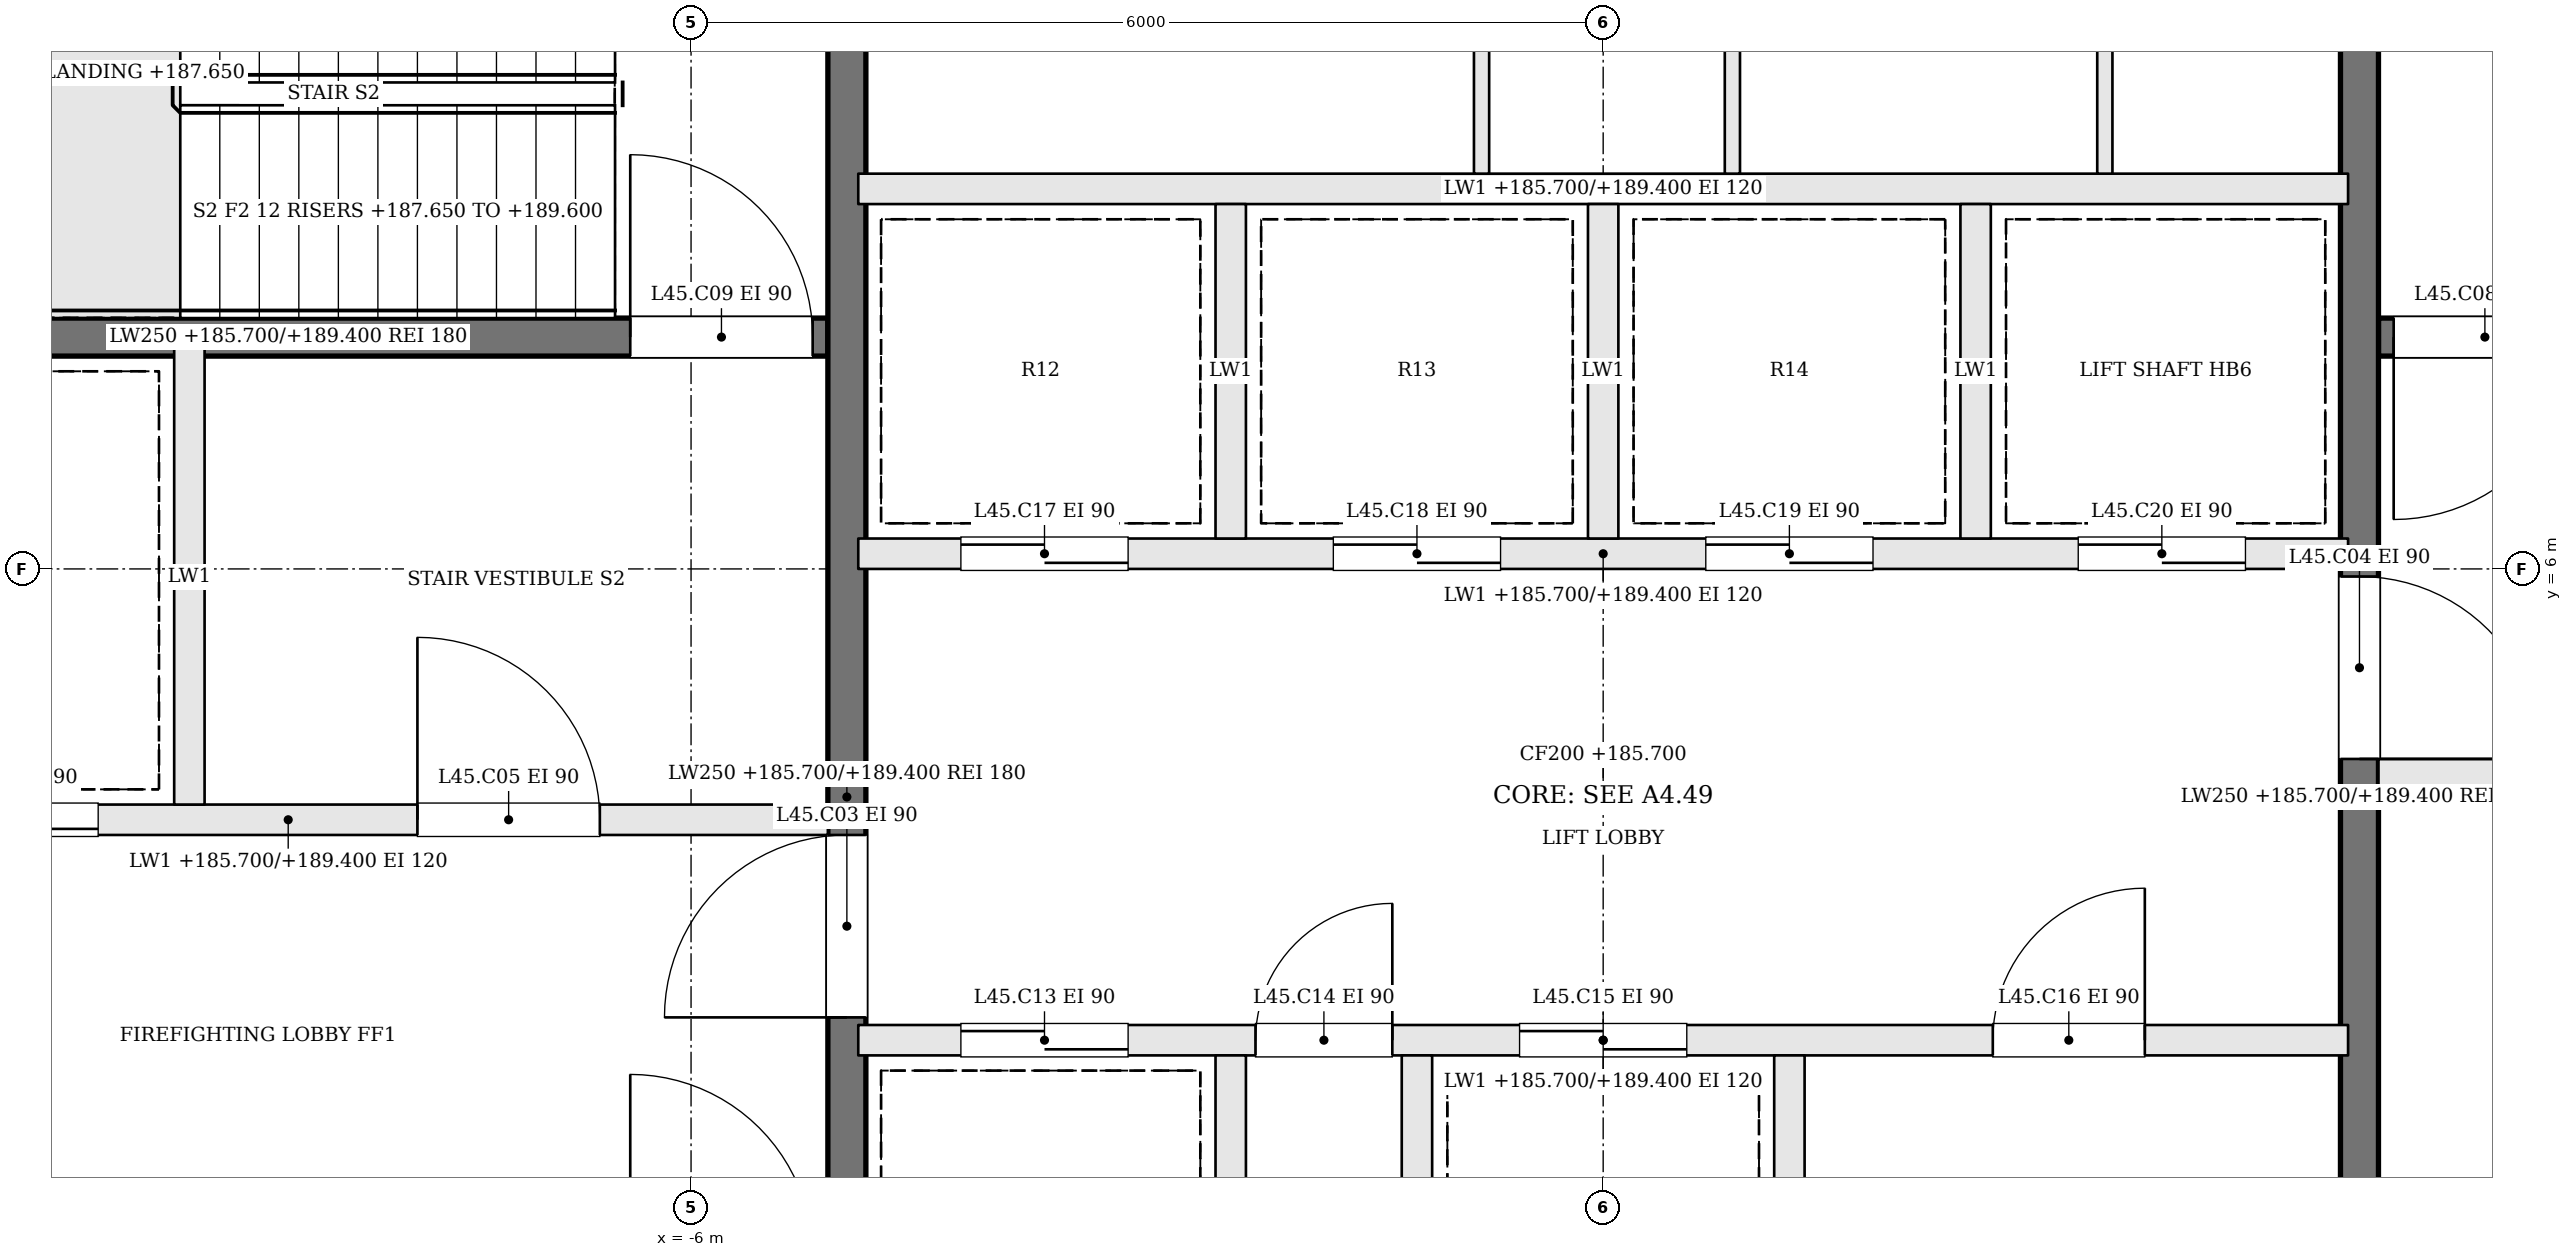
"""IFC4 building model, lengths in metres.
Left out: names, types, materials, properties, quantities, classifications, styles, units other than length and angle.
Written with IfcOpenShell. Run it as: python <this file> out.ifc"""

import sys

from ifc_helpers import new_model, si_unit, direction, frame, frame_2d, origin, place, context, subcontext, project, spatial, rectangle, extrude, element, fill, save


model = new_model("IFC4")
c1 = context("Model", 3, precision=1e-05, world=origin(), true_north=direction((0.0, 1.0)))
c2 = subcontext(c1, "Body", "Model", "MODEL_VIEW")
j1 = project(units=[si_unit("LENGTHUNIT", "METRE"), si_unit("PLANEANGLEUNIT", "RADIAN")], contexts=[c1])
p1 = place(None, origin())
s1 = spatial("IfcSite", under=j1, at=p1, CompositionType="ELEMENT")
p2 = place(p1, origin())
s2 = spatial("IfcBuilding", under=s1, at=p2, CompositionType="ELEMENT")
p3 = place(p2, frame((0.0, 0.0, 185.7)))
s3 = spatial("IfcBuildingStorey", under=s2, at=p3, CompositionType="ELEMENT", Elevation=185.7)
p4 = place(p3, frame((12.2, 7.525, 0.0), z_axis=(0.0, 0.0, 1.0), x_axis=(-1.0, 0.0, 0.0)))
e1 = element("IfcWall", 1, at=p4, inside=s3, PredefinedType="SOLIDWALL", context=c2, shape_type="SweptSolid", body=[
    extrude(rectangle(XDim=7.1, YDim=0.25, at=frame_2d((3.55, 0.0))), origin(), (0.0, 0.0, 1.0), 3.7),
])
p5 = place(p4, frame((5.8, 0.0, 0.0)))
e2 = element("IfcOpeningElement", 2, at=p5, cuts=e1, PredefinedType="OPENING", context=c2, shape_type="SweptSolid", body=[
    extrude(rectangle(XDim=1.2, YDim=2.1, at=frame_2d((0.6, 1.05))), frame((0.0, 0.135, 0.0), z_axis=(0.0, -1.0, 0.0), x_axis=(1.0, 0.0, 0.0)), (0.0, 0.0, 1.0), 0.27),
])
p6 = place(p3, frame((-12.2, 4.35, 0.0), z_axis=(0.0, 0.0, 1.0), x_axis=(1.0, 0.0, 0.0)))
e3 = element("IfcWall", 3, at=p6, inside=s3, PredefinedType="SOLIDWALL", context=c2, shape_type="SweptSolid", body=[
    extrude(rectangle(XDim=7.1, YDim=0.2, at=frame_2d((3.55, 0.0))), origin(), (0.0, 0.0, 1.0), 3.7),
])
p7 = place(p6, frame((4.4, 0.0, 0.0)))
e4 = element("IfcOpeningElement", 4, at=p7, cuts=e3, PredefinedType="OPENING", context=c2, shape_type="SweptSolid", body=[
    extrude(rectangle(XDim=1.2, YDim=2.1, at=frame_2d((0.6, 1.05))), frame((0.0, 0.11, 0.0), z_axis=(0.0, -1.0, 0.0), x_axis=(1.0, 0.0, 0.0)), (0.0, 0.0, 1.0), 0.22),
])
p8 = place(p6, frame((1.1, 0.0, 0.0)))
e5 = element("IfcOpeningElement", 5, at=p8, cuts=e3, PredefinedType="OPENING", context=c2, shape_type="SweptSolid", body=[
    extrude(rectangle(XDim=1.2, YDim=2.1, at=frame_2d((0.6, 1.05))), frame((0.0, 0.11, 0.0), z_axis=(0.0, -1.0, 0.0), x_axis=(1.0, 0.0, 0.0)), (0.0, 0.0, 1.0), 0.22),
])
p9 = place(p3, frame((12.2, 4.65, 0.0), z_axis=(0.0, 0.0, 1.0), x_axis=(-1.0, 0.0, 0.0)))
e6 = element("IfcWall", 6, at=p9, inside=s3, PredefinedType="SOLIDWALL", context=c2, shape_type="SweptSolid", body=[
    extrude(rectangle(XDim=7.1, YDim=0.2, at=frame_2d((3.55, 0.0))), origin(), (0.0, 0.0, 1.0), 3.7),
])
p10 = place(p9, frame((4.4, 0.0, 0.0)))
e7 = element("IfcOpeningElement", 7, at=p10, cuts=e6, PredefinedType="OPENING", context=c2, shape_type="SweptSolid", body=[
    extrude(rectangle(XDim=1.2, YDim=2.1, at=frame_2d((0.6, 1.05))), frame((0.0, 0.11, 0.0), z_axis=(0.0, -1.0, 0.0), x_axis=(1.0, 0.0, 0.0)), (0.0, 0.0, 1.0), 0.22),
])
p11 = place(p9, frame((1.1, 0.0, 0.0)))
e8 = element("IfcOpeningElement", 8, at=p11, cuts=e6, PredefinedType="OPENING", context=c2, shape_type="SweptSolid", body=[
    extrude(rectangle(XDim=1.2, YDim=2.1, at=frame_2d((0.6, 1.05))), frame((0.0, 0.11, 0.0), z_axis=(0.0, -1.0, 0.0), x_axis=(1.0, 0.0, 0.0)), (0.0, 0.0, 1.0), 0.22),
])
p12 = place(p3, frame((-12.2, 7.525, 0.0), z_axis=(0.0, 0.0, 1.0), x_axis=(1.0, 0.0, 0.0)))
e9 = element("IfcWall", 9, at=p12, inside=s3, PredefinedType="SOLIDWALL", context=c2, shape_type="SweptSolid", body=[
    extrude(rectangle(XDim=7.1, YDim=0.25, at=frame_2d((3.55, 0.0))), origin(), (0.0, 0.0, 1.0), 3.7),
])
p13 = place(p12, frame((5.8, 0.0, 0.0)))
e10 = element("IfcOpeningElement", 10, at=p13, cuts=e9, PredefinedType="OPENING", context=c2, shape_type="SweptSolid", body=[
    extrude(rectangle(XDim=1.2, YDim=2.1, at=frame_2d((0.6, 1.05))), frame((0.0, 0.135, 0.0), z_axis=(0.0, -1.0, 0.0), x_axis=(1.0, 0.0, 0.0)), (0.0, 0.0, 1.0), 0.27),
])
p14 = place(p3, frame((-9.3, 4.45, 0.0), z_axis=(0.0, 0.0, 1.0), x_axis=(0.0, 1.0, 0.0)))
e11 = element("IfcWall", 11, at=p14, inside=s3, PredefinedType="SOLIDWALL", context=c2, shape_type="SweptSolid", body=[
    extrude(rectangle(XDim=3.0, YDim=0.2, at=frame_2d((1.5, 0.0))), origin(), (0.0, 0.0, 1.0), 3.7),
])
p15 = place(p3, frame((-4.975, -2.2, 0.0), z_axis=(0.0, 0.0, 1.0), x_axis=(0.0, 1.0, 0.0)))
e12 = element("IfcWall", 12, at=p15, inside=s3, PredefinedType="SOLIDWALL", context=c2, shape_type="SweptSolid", body=[
    extrude(rectangle(XDim=13.4, YDim=0.25, at=frame_2d((6.7, 0.0))), origin(), (0.0, 0.0, 1.0), 3.7),
])
p16 = place(p15, frame((5.25, 0.0, 0.0)))
e13 = element("IfcOpeningElement", 13, at=p16, cuts=e12, PredefinedType="OPENING", context=c2, shape_type="SweptSolid", body=[
    extrude(rectangle(XDim=1.2, YDim=2.1, at=frame_2d((0.6, 1.05))), frame((0.0, 0.135, 0.0), z_axis=(0.0, -1.0, 0.0), x_axis=(1.0, 0.0, 0.0)), (0.0, 0.0, 1.0), 0.27),
])
p17 = place(p3, frame((4.975, 11.2, 0.0), z_axis=(0.0, 0.0, 1.0), x_axis=(0.0, -1.0, 0.0)))
e14 = element("IfcWall", 14, at=p17, inside=s3, PredefinedType="SOLIDWALL", context=c2, shape_type="SweptSolid", body=[
    extrude(rectangle(XDim=13.4, YDim=0.25, at=frame_2d((6.7, 0.0))), origin(), (0.0, 0.0, 1.0), 3.7),
])
p18 = place(p17, frame((5.25, 0.0, 0.0)))
e15 = element("IfcOpeningElement", 15, at=p18, cuts=e14, PredefinedType="OPENING", context=c2, shape_type="SweptSolid", body=[
    extrude(rectangle(XDim=1.2, YDim=2.1, at=frame_2d((0.6, 1.05))), frame((0.0, 0.135, 0.0), z_axis=(0.0, -1.0, 0.0), x_axis=(1.0, 0.0, 0.0)), (0.0, 0.0, 1.0), 0.27),
])
p19 = place(p3, frame((-4.9, 2.9, 0.0), z_axis=(0.0, 0.0, 1.0), x_axis=(1.0, 0.0, 0.0)))
e16 = element("IfcWall", 16, at=p19, inside=s3, PredefinedType="SOLIDWALL", context=c2, shape_type="SweptSolid", body=[
    extrude(rectangle(XDim=9.8, YDim=0.2, at=frame_2d((4.9, 0.0))), origin(), (0.0, 0.0, 1.0), 3.7),
])
p20 = place(p19, frame((0.675, 0.0, 0.0)))
e17 = element("IfcOpeningElement", 17, at=p20, cuts=e16, PredefinedType="OPENING", context=c2, shape_type="SweptSolid", body=[
    extrude(rectangle(XDim=1.1, YDim=2.1, at=frame_2d((0.55, 1.05))), frame((0.0, 0.11, 0.0), z_axis=(0.0, -1.0, 0.0), x_axis=(1.0, 0.0, 0.0)), (0.0, 0.0, 1.0), 0.22),
])
p21 = place(p19, frame((2.613, 0.0, 0.0)))
e18 = element("IfcOpeningElement", 18, at=p21, cuts=e16, PredefinedType="OPENING", context=c2, shape_type="SweptSolid", body=[
    extrude(rectangle(XDim=0.9, YDim=2.1, at=frame_2d((0.45, 1.05))), frame((0.0, 0.11, 0.0), z_axis=(0.0, -1.0, 0.0), x_axis=(1.0, 0.0, 0.0)), (0.0, 0.0, 1.0), 0.22),
])
p22 = place(p19, frame((4.35, 0.0, 0.0)))
e19 = element("IfcOpeningElement", 19, at=p22, cuts=e16, PredefinedType="OPENING", context=c2, shape_type="SweptSolid", body=[
    extrude(rectangle(XDim=1.1, YDim=2.1, at=frame_2d((0.55, 1.05))), frame((0.0, 0.11, 0.0), z_axis=(0.0, -1.0, 0.0), x_axis=(1.0, 0.0, 0.0)), (0.0, 0.0, 1.0), 0.22),
])
p23 = place(p19, frame((7.463, 0.0, 0.0)))
e20 = element("IfcOpeningElement", 20, at=p23, cuts=e16, PredefinedType="OPENING", context=c2, shape_type="SweptSolid", body=[
    extrude(rectangle(XDim=1.0, YDim=2.1, at=frame_2d((0.5, 1.05))), frame((0.0, 0.11, 0.0), z_axis=(0.0, -1.0, 0.0), x_axis=(1.0, 0.0, 0.0)), (0.0, 0.0, 1.0), 0.22),
])
p24 = place(p3, frame((-4.9, 6.1, 0.0), z_axis=(0.0, 0.0, 1.0), x_axis=(1.0, 0.0, 0.0)))
e21 = element("IfcWall", 21, at=p24, inside=s3, PredefinedType="SOLIDWALL", context=c2, shape_type="SweptSolid", body=[
    extrude(rectangle(XDim=9.8, YDim=0.2, at=frame_2d((4.9, 0.0))), origin(), (0.0, 0.0, 1.0), 3.7),
])
p25 = place(p24, frame((0.675, 0.0, 0.0)))
e22 = element("IfcOpeningElement", 22, at=p25, cuts=e21, PredefinedType="OPENING", context=c2, shape_type="SweptSolid", body=[
    extrude(rectangle(XDim=1.1, YDim=2.1, at=frame_2d((0.55, 1.05))), frame((0.0, 0.11, 0.0), z_axis=(0.0, -1.0, 0.0), x_axis=(1.0, 0.0, 0.0)), (0.0, 0.0, 1.0), 0.22),
])
p26 = place(p24, frame((3.125, 0.0, 0.0)))
e23 = element("IfcOpeningElement", 23, at=p26, cuts=e21, PredefinedType="OPENING", context=c2, shape_type="SweptSolid", body=[
    extrude(rectangle(XDim=1.1, YDim=2.1, at=frame_2d((0.55, 1.05))), frame((0.0, 0.11, 0.0), z_axis=(0.0, -1.0, 0.0), x_axis=(1.0, 0.0, 0.0)), (0.0, 0.0, 1.0), 0.22),
])
p27 = place(p24, frame((5.575, 0.0, 0.0)))
e24 = element("IfcOpeningElement", 24, at=p27, cuts=e21, PredefinedType="OPENING", context=c2, shape_type="SweptSolid", body=[
    extrude(rectangle(XDim=1.1, YDim=2.1, at=frame_2d((0.55, 1.05))), frame((0.0, 0.11, 0.0), z_axis=(0.0, -1.0, 0.0), x_axis=(1.0, 0.0, 0.0)), (0.0, 0.0, 1.0), 0.22),
])
p28 = place(p24, frame((8.025, 0.0, 0.0)))
e25 = element("IfcOpeningElement", 25, at=p28, cuts=e21, PredefinedType="OPENING", context=c2, shape_type="SweptSolid", body=[
    extrude(rectangle(XDim=1.1, YDim=2.1, at=frame_2d((0.55, 1.05))), frame((0.0, 0.11, 0.0), z_axis=(0.0, -1.0, 0.0), x_axis=(1.0, 0.0, 0.0)), (0.0, 0.0, 1.0), 0.22),
])
p29 = place(p3, frame((-4.9, 8.5, 0.0), z_axis=(0.0, 0.0, 1.0), x_axis=(1.0, 0.0, 0.0)))
e26 = element("IfcWall", 26, at=p29, inside=s3, PredefinedType="SOLIDWALL", context=c2, shape_type="SweptSolid", body=[
    extrude(rectangle(XDim=9.8, YDim=0.2, at=frame_2d((4.9, 0.0))), origin(), (0.0, 0.0, 1.0), 3.7),
])
for number, where, z_axis, x_axis in (
    (27, (-2.45, 0.6, 0.0), (0.0, 0.0, 1.0), (0.0, 1.0, 0.0)),
    (28, (-1.225, 0.6, 0.0), (0.0, 0.0, 1.0), (0.0, 1.0, 0.0)),
    (29, (1.225, 0.6, 0.0), (0.0, 0.0, 1.0), (0.0, 1.0, 0.0)),
    (30, (-2.45, 6.2, 0.0), (0.0, 0.0, 1.0), (0.0, 1.0, 0.0)),
    (31, (0.0, 6.2, 0.0), (0.0, 0.0, 1.0), (0.0, 1.0, 0.0)),
    (32, (2.45, 6.2, 0.0), (0.0, 0.0, 1.0), (0.0, 1.0, 0.0)),
):
    element("IfcWall", number, at=place(p3, frame(where, z_axis=z_axis, x_axis=x_axis)), inside=s3, PredefinedType="SOLIDWALL", context=c2, shape_type="SweptSolid", body=[
        extrude(rectangle(XDim=2.2, YDim=0.2, at=frame_2d((1.1, 0.0))), origin(), (0.0, 0.0, 1.0), 3.7),
    ])
for number, where, z_axis, x_axis in (
    (33, (-0.8, 8.6, 0.0), (0.0, 0.0, 1.0), (0.0, 1.0, 0.0)),
    (34, (0.85, 8.6, 0.0), (0.0, 0.0, 1.0), (0.0, 1.0, 0.0)),
    (35, (3.3, 8.6, 0.0), (0.0, 0.0, 1.0), (0.0, 1.0, 0.0)),
):
    element("IfcWall", number, at=place(p3, frame(where, z_axis=z_axis, x_axis=x_axis)), inside=s3, PredefinedType="PARTITIONING", context=c2, shape_type="SweptSolid", body=[
        extrude(rectangle(XDim=2.6, YDim=0.1, at=frame_2d((1.3, 0.0))), origin(), (0.0, 0.0, 1.0), 3.7),
    ])
p30 = place(p16, origin())
e36 = element("IfcDoor", 36, at=p30, inside=s3, OperationType="SINGLE_SWING_LEFT", PredefinedType="DOOR", context=c2, shape_type="SweptSolid", body=[
    extrude(rectangle(XDim=1.2, YDim=2.1, at=frame_2d((0.6, 1.05))), frame((0.0, 0.025, 0.0), z_axis=(0.0, -1.0, 0.0), x_axis=(1.0, 0.0, 0.0)), (0.0, 0.0, 1.0), 0.05),
])
fill(e13, e36)
p31 = place(p18, origin())
e37 = element("IfcDoor", 37, at=p31, inside=s3, OperationType="SINGLE_SWING_RIGHT", PredefinedType="DOOR", context=c2, shape_type="SweptSolid", body=[
    extrude(rectangle(XDim=1.2, YDim=2.1, at=frame_2d((0.6, 1.05))), frame((0.0, 0.025, 0.0), z_axis=(0.0, -1.0, 0.0), x_axis=(1.0, 0.0, 0.0)), (0.0, 0.0, 1.0), 0.05),
])
fill(e15, e37)
p32 = place(p7, origin())
e38 = element("IfcDoor", 38, at=p32, inside=s3, OperationType="SINGLE_SWING_LEFT", PredefinedType="DOOR", context=c2, shape_type="SweptSolid", body=[
    extrude(rectangle(XDim=1.2, YDim=2.1, at=frame_2d((0.6, 1.05))), frame((0.0, 0.025, 0.0), z_axis=(0.0, -1.0, 0.0), x_axis=(1.0, 0.0, 0.0)), (0.0, 0.0, 1.0), 0.05),
])
fill(e4, e38)
p33 = place(p5, origin())
e39 = element("IfcDoor", 39, at=p33, inside=s3, OperationType="SINGLE_SWING_RIGHT", PredefinedType="DOOR", context=c2, shape_type="SweptSolid", body=[
    extrude(rectangle(XDim=1.2, YDim=2.1, at=frame_2d((0.6, 1.05))), frame((0.0, 0.025, 0.0), z_axis=(0.0, -1.0, 0.0), x_axis=(1.0, 0.0, 0.0)), (0.0, 0.0, 1.0), 0.05),
])
fill(e2, e39)
p34 = place(p13, origin())
e40 = element("IfcDoor", 40, at=p34, inside=s3, OperationType="SINGLE_SWING_LEFT", PredefinedType="DOOR", context=c2, shape_type="SweptSolid", body=[
    extrude(rectangle(XDim=1.2, YDim=2.1, at=frame_2d((0.6, 1.05))), frame((0.0, 0.025, 0.0), z_axis=(0.0, -1.0, 0.0), x_axis=(1.0, 0.0, 0.0)), (0.0, 0.0, 1.0), 0.05),
])
fill(e10, e40)
p35 = place(p8, origin())
e41 = element("IfcDoor", 41, at=p35, inside=s3, OperationType="SLIDING_TO_RIGHT", PredefinedType="DOOR", context=c2, shape_type="SweptSolid", body=[
    extrude(rectangle(XDim=1.2, YDim=2.1, at=frame_2d((0.6, 1.05))), frame((0.0, 0.025, 0.0), z_axis=(0.0, -1.0, 0.0), x_axis=(1.0, 0.0, 0.0)), (0.0, 0.0, 1.0), 0.05),
])
fill(e5, e41)
p36 = place(p20, origin())
e42 = element("IfcDoor", 42, at=p36, inside=s3, OperationType="SLIDING_TO_RIGHT", PredefinedType="DOOR", context=c2, shape_type="SweptSolid", body=[
    extrude(rectangle(XDim=1.1, YDim=2.1, at=frame_2d((0.55, 1.05))), frame((0.0, 0.025, 0.0), z_axis=(0.0, -1.0, 0.0), x_axis=(1.0, 0.0, 0.0)), (0.0, 0.0, 1.0), 0.05),
])
fill(e17, e42)
p37 = place(p21, origin())
e43 = element("IfcDoor", 43, at=p37, inside=s3, OperationType="SINGLE_SWING_RIGHT", PredefinedType="DOOR", context=c2, shape_type="SweptSolid", body=[
    extrude(rectangle(XDim=0.9, YDim=2.1, at=frame_2d((0.45, 1.05))), frame((0.0, 0.025, 0.0), z_axis=(0.0, -1.0, 0.0), x_axis=(1.0, 0.0, 0.0)), (0.0, 0.0, 1.0), 0.05),
])
fill(e18, e43)
p38 = place(p22, origin())
e44 = element("IfcDoor", 44, at=p38, inside=s3, OperationType="SLIDING_TO_LEFT", PredefinedType="DOOR", context=c2, shape_type="SweptSolid", body=[
    extrude(rectangle(XDim=1.1, YDim=2.1, at=frame_2d((0.55, 1.05))), frame((0.0, 0.025, 0.0), z_axis=(0.0, -1.0, 0.0), x_axis=(1.0, 0.0, 0.0)), (0.0, 0.0, 1.0), 0.05),
])
fill(e19, e44)
p39 = place(p23, origin())
e45 = element("IfcDoor", 45, at=p39, inside=s3, OperationType="SINGLE_SWING_RIGHT", PredefinedType="DOOR", context=c2, shape_type="SweptSolid", body=[
    extrude(rectangle(XDim=1.0, YDim=2.1, at=frame_2d((0.5, 1.05))), frame((0.0, 0.025, 0.0), z_axis=(0.0, -1.0, 0.0), x_axis=(1.0, 0.0, 0.0)), (0.0, 0.0, 1.0), 0.05),
])
fill(e20, e45)
p40 = place(p25, origin())
e46 = element("IfcDoor", 46, at=p40, inside=s3, OperationType="SLIDING_TO_RIGHT", PredefinedType="DOOR", context=c2, shape_type="SweptSolid", body=[
    extrude(rectangle(XDim=1.1, YDim=2.1, at=frame_2d((0.55, 1.05))), frame((0.0, 0.025, 0.0), z_axis=(0.0, -1.0, 0.0), x_axis=(1.0, 0.0, 0.0)), (0.0, 0.0, 1.0), 0.05),
])
fill(e22, e46)
p41 = place(p26, origin())
e47 = element("IfcDoor", 47, at=p41, inside=s3, OperationType="SLIDING_TO_LEFT", PredefinedType="DOOR", context=c2, shape_type="SweptSolid", body=[
    extrude(rectangle(XDim=1.1, YDim=2.1, at=frame_2d((0.55, 1.05))), frame((0.0, 0.025, 0.0), z_axis=(0.0, -1.0, 0.0), x_axis=(1.0, 0.0, 0.0)), (0.0, 0.0, 1.0), 0.05),
])
fill(e23, e47)
p42 = place(p27, origin())
e48 = element("IfcDoor", 48, at=p42, inside=s3, OperationType="SLIDING_TO_RIGHT", PredefinedType="DOOR", context=c2, shape_type="SweptSolid", body=[
    extrude(rectangle(XDim=1.1, YDim=2.1, at=frame_2d((0.55, 1.05))), frame((0.0, 0.025, 0.0), z_axis=(0.0, -1.0, 0.0), x_axis=(1.0, 0.0, 0.0)), (0.0, 0.0, 1.0), 0.05),
])
fill(e24, e48)
p43 = place(p28, origin())
e49 = element("IfcDoor", 49, at=p43, inside=s3, OperationType="SLIDING_TO_LEFT", PredefinedType="DOOR", context=c2, shape_type="SweptSolid", body=[
    extrude(rectangle(XDim=1.1, YDim=2.1, at=frame_2d((0.55, 1.05))), frame((0.0, 0.025, 0.0), z_axis=(0.0, -1.0, 0.0), x_axis=(1.0, 0.0, 0.0)), (0.0, 0.0, 1.0), 0.05),
])
fill(e25, e49)
save(model, sys.argv[1])
